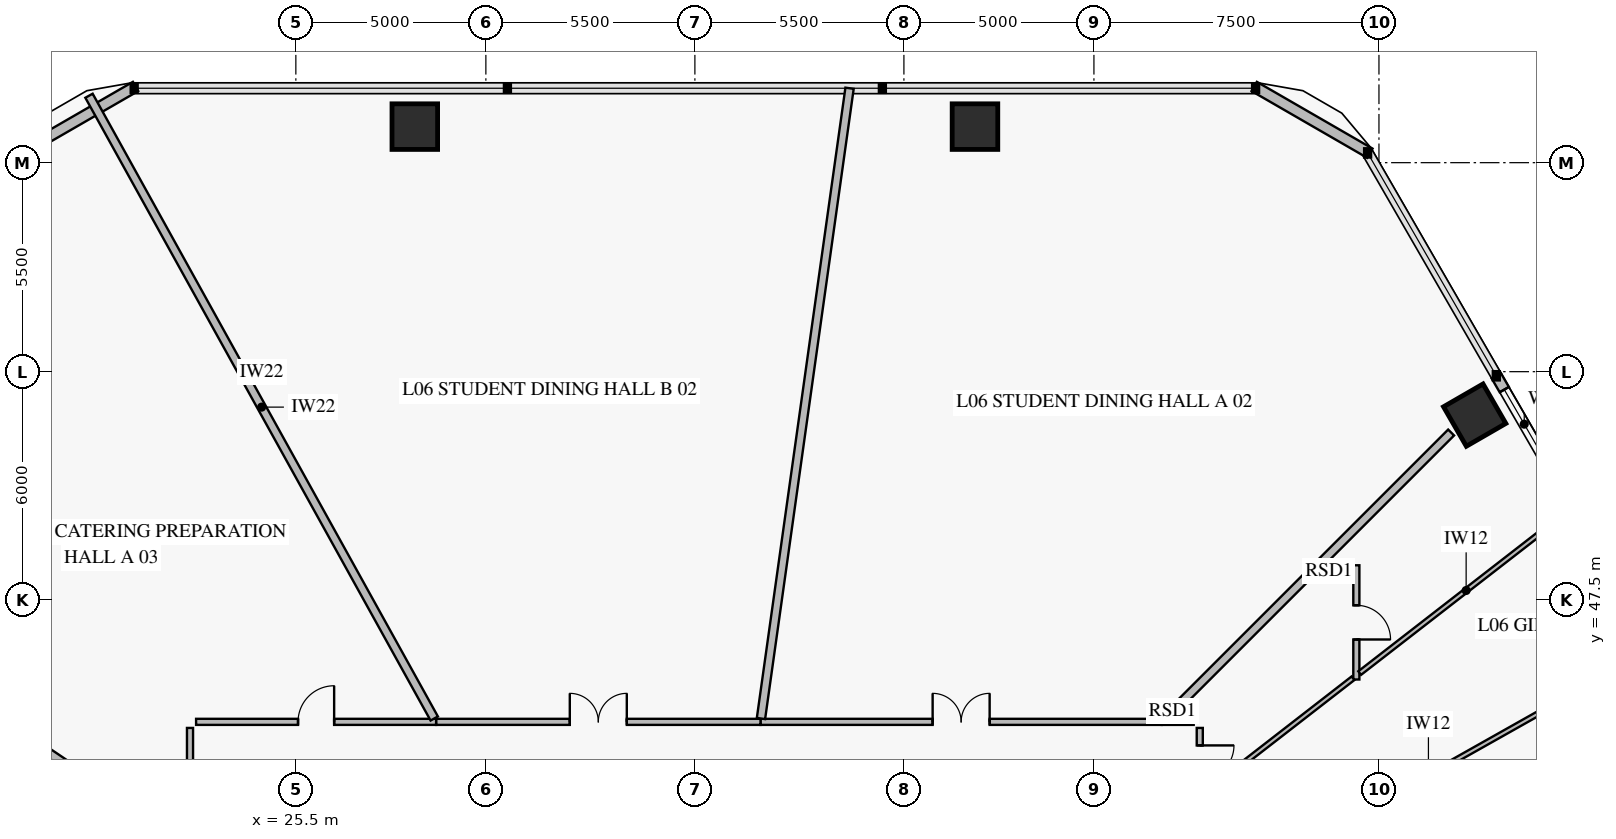
"""IFC4 building model, lengths in metres.
Left out: names, types, materials, properties, quantities, classifications, styles, units other than length and angle.
Written with IfcOpenShell. Run it as: python <this file> out.ifc"""

import sys

from ifc_helpers import new_model, si_unit, direction, frame, frame_2d, origin, origin_2d, place, context, subcontext, project, spatial, rectangle, extrude, element, fill, save


model = new_model("IFC4")
c1 = context("Model", 3, precision=1e-05, world=origin(), true_north=direction((0.0, 1.0)))
c2 = subcontext(c1, "Body", "Model", "MODEL_VIEW")
j1 = project(units=[si_unit("LENGTHUNIT", "METRE"), si_unit("PLANEANGLEUNIT", "RADIAN")], contexts=[c1])
p1 = place(None, origin())
s1 = spatial("IfcSite", under=j1, at=p1, CompositionType="ELEMENT")
p2 = place(p1, origin())
s2 = spatial("IfcBuilding", under=s1, at=p2, CompositionType="ELEMENT")
p3 = place(p2, frame((0.0, 0.0, 24.6)))
s3 = spatial("IfcBuildingStorey", under=s2, at=p3, CompositionType="ELEMENT", Elevation=24.6)
for number, where, z_axis, x_axis in (
    (1, (56.519, 52.357, 0.0), (0.0, 0.0, 1.0), (-0.5, 0.866, 0.0)),
    (2, (43.37, 59.948, 0.0), (0.0, 0.0, 1.0), (-1.0, 0.0, 0.0)),
    (3, (28.63, 59.948, 0.0), (0.0, 0.0, 1.0), (-1.0, 0.0, 0.0)),
):
    element("IfcColumn", number, at=place(p3, frame(where, z_axis=z_axis, x_axis=x_axis)), inside=s3, PredefinedType="COLUMN", context=c2, shape_type="SweptSolid", body=[
        extrude(rectangle(XDim=1.2, YDim=1.2, at=origin_2d()), origin(), (0.0, 0.0, 1.0), 3.92),
    ])
for number, where, z_axis, x_axis in (
    (4, (18.239, 59.249, 0.0), (0.0, 0.0, 1.0), (0.866, 0.5, 0.0)),
    (5, (50.717, 61.006, 0.0), (0.0, 0.0, 1.0), (0.866, -0.5, 0.0)),
):
    element("IfcWall", number, at=place(p3, frame(where, z_axis=z_axis, x_axis=x_axis)), inside=s3, PredefinedType="SOLIDWALL", context=c2, shape_type="SweptSolid", body=[
        extrude(rectangle(XDim=3.515, YDim=0.28, at=frame_2d((1.757, 0.0))), origin(), (0.0, 0.0, 1.0), 3.92),
    ])
p4 = place(p3, frame((57.088, 53.392, 0.0), z_axis=(0.0, 0.0, 1.0), x_axis=(0.500024377727, -0.866011328839, 0.0)))
e6 = element("IfcWall", 6, at=p4, inside=s3, PredefinedType="SOLIDWALL", context=c2, shape_type="SweptSolid", body=[
    extrude(rectangle(XDim=2.94, YDim=0.28, at=frame_2d((1.47, 0.0))), origin(), (0.0, 0.0, 1.0), 3.92),
])
p5 = place(p4, frame((0.42, 0.0, 0.7)))
e7 = element("IfcOpeningElement", 7, at=p5, cuts=e6, PredefinedType="OPENING", context=c2, shape_type="SweptSolid", body=[
    extrude(rectangle(XDim=2.1, YDim=1.5, at=frame_2d((1.05, 0.75))), frame((0.0, 0.152, 0.0), z_axis=(0.0, -1.0, 0.0), x_axis=(1.0, 0.0, 0.0)), (0.0, 0.0, 1.0), 0.304),
])
p6 = place(p3, frame((53.405, 48.405, 0.0), z_axis=(0.0, 0.0, 1.0), x_axis=(0.0, -1.0, 0.0)))
e8 = element("IfcWall", 8, at=p6, inside=s3, PredefinedType="PARTITIONING", context=c2, shape_type="SweptSolid", body=[
    extrude(rectangle(XDim=3.006, YDim=0.16, at=frame_2d((1.503, 0.0))), origin(), (0.0, 0.0, 1.0), 3.92),
])
p7 = place(p6, frame((1.053, 0.0, 0.0)))
e9 = element("IfcOpeningElement", 9, at=p7, cuts=e8, PredefinedType="OPENING", context=c2, shape_type="SweptSolid", body=[
    extrude(rectangle(XDim=0.9, YDim=2.1, at=frame_2d((0.45, 1.05))), frame((0.0, 0.092, 0.0), z_axis=(0.0, -1.0, 0.0), x_axis=(1.0, 0.0, 0.0)), (0.0, 0.0, 1.0), 0.184),
])
p8 = place(p3, frame((49.285, 42.305, 0.0), z_axis=(0.0, 0.0, 1.0), x_axis=(0.0, 1.0, 0.0)))
e10 = element("IfcWall", 10, at=p8, inside=s3, PredefinedType="PARTITIONING", context=c2, shape_type="SweptSolid", body=[
    extrude(rectangle(XDim=1.82, YDim=0.16, at=frame_2d((0.91, 0.0))), origin(), (0.0, 0.0, 1.0), 3.92),
])
p9 = place(p8, frame((0.46, 0.0, 0.0)))
e11 = element("IfcOpeningElement", 11, at=p9, cuts=e10, PredefinedType="OPENING", context=c2, shape_type="SweptSolid", body=[
    extrude(rectangle(XDim=0.9, YDim=2.1, at=frame_2d((0.45, 1.05))), frame((0.0, 0.092, 0.0), z_axis=(0.0, -1.0, 0.0), x_axis=(1.0, 0.0, 0.0)), (0.0, 0.0, 1.0), 0.184),
])
p10 = place(p3, frame((48.285, 44.285, 0.0), z_axis=(0.0, 0.0, 1.0), x_axis=(-1.0, 0.0, 0.0)))
e12 = element("IfcWall", 12, at=p10, inside=s3, PredefinedType="PARTITIONING", context=c2, shape_type="SweptSolid", body=[
    extrude(rectangle(XDim=10.558, YDim=0.16, at=frame_2d((5.279, 0.0))), origin(), (0.0, 0.0, 1.0), 3.22),
])
p11 = place(p10, frame((4.529, 0.0, 0.0)))
e13 = element("IfcOpeningElement", 13, at=p11, cuts=e12, PredefinedType="OPENING", context=c2, shape_type="SweptSolid", body=[
    extrude(rectangle(XDim=1.5, YDim=2.15, at=frame_2d((0.75, 1.075))), frame((0.0, 0.092, 0.0), z_axis=(0.0, -1.0, 0.0), x_axis=(1.0, 0.0, 0.0)), (0.0, 0.0, 1.0), 0.184),
])
p12 = place(p3, frame((37.727, 44.285, 0.0), z_axis=(0.0, 0.0, 1.0), x_axis=(-1.0, 0.0, 0.0)))
e14 = element("IfcWall", 14, at=p12, inside=s3, PredefinedType="PARTITIONING", context=c2, shape_type="SweptSolid", body=[
    extrude(rectangle(XDim=8.536, YDim=0.16, at=frame_2d((4.268, 0.0))), origin(), (0.0, 0.0, 1.0), 3.22),
])
p13 = place(p12, frame((3.518, 0.0, 0.0)))
e15 = element("IfcOpeningElement", 15, at=p13, cuts=e14, PredefinedType="OPENING", context=c2, shape_type="SweptSolid", body=[
    extrude(rectangle(XDim=1.5, YDim=2.15, at=frame_2d((0.75, 1.075))), frame((0.0, 0.092, 0.0), z_axis=(0.0, -1.0, 0.0), x_axis=(1.0, 0.0, 0.0)), (0.0, 0.0, 1.0), 0.184),
])
p14 = place(p3, frame((29.19, 44.285, 0.0), z_axis=(0.0, 0.0, 1.0), x_axis=(-1.0, 0.0, 0.0)))
e16 = element("IfcWall", 16, at=p14, inside=s3, PredefinedType="PARTITIONING", context=c2, shape_type="SweptSolid", body=[
    extrude(rectangle(XDim=6.315, YDim=0.16, at=frame_2d((3.158, 0.0))), origin(), (0.0, 0.0, 1.0), 3.22),
])
p15 = place(p14, frame((2.683, 0.0, 0.0)))
e17 = element("IfcOpeningElement", 17, at=p15, cuts=e16, PredefinedType="OPENING", context=c2, shape_type="SweptSolid", body=[
    extrude(rectangle(XDim=0.95, YDim=2.1, at=frame_2d((0.475, 1.05))), frame((0.0, 0.092, 0.0), z_axis=(0.0, -1.0, 0.0), x_axis=(1.0, 0.0, 0.0)), (0.0, 0.0, 1.0), 0.184),
])
p16 = place(p3, frame((49.373, 39.535, 0.0), z_axis=(0.0, 0.0, 1.0), x_axis=(0.871218886354, 0.490894746417, 0.0)))
e18 = element("IfcWall", 18, at=p16, inside=s3, PredefinedType="PARTITIONING", context=c2, shape_type="SweptSolid", body=[
    extrude(rectangle(XDim=13.61, YDim=0.12, at=frame_2d((6.805, 0.0))), origin(), (0.0, 0.0, 1.0), 3.17),
])
p17 = place(p3, frame((49.373, 42.373, 0.0), z_axis=(0.0, 0.0, 1.0), x_axis=(0.790162754328, 0.612897072658, 0.0)))
e19 = element("IfcWall", 19, at=p17, inside=s3, PredefinedType="PARTITIONING", context=c2, shape_type="SweptSolid", body=[
    extrude(rectangle(XDim=4.991, YDim=0.12, at=frame_2d((2.496, 0.0))), origin(), (0.0, 0.0, 1.0), 3.47),
])
p18 = place(p3, frame((53.493, 45.569, 0.0), z_axis=(0.0, 0.0, 1.0), x_axis=(0.79017658067, 0.612879246965, 0.0)))
e20 = element("IfcWall", 20, at=p18, inside=s3, PredefinedType="PARTITIONING", context=c2, shape_type="SweptSolid", body=[
    extrude(rectangle(XDim=7.09, YDim=0.12, at=frame_2d((3.545, 0.0))), origin(), (0.0, 0.0, 1.0), 3.17),
])
p19 = place(p3, frame((52.292, 48.405, 0.0), z_axis=(0.0, 0.0, 1.0), x_axis=(1.0, 0.0, 0.0)))
e21 = element("IfcWall", 21, at=p19, inside=s3, PredefinedType="PARTITIONING", context=c2, shape_type="SweptSolid", body=[
    extrude(rectangle(XDim=1.025, YDim=0.16, at=frame_2d((0.512, 0.0))), origin(), (0.0, 0.0, 1.0), 3.22),
])
p20 = place(p3, frame((49.125, 44.285, 0.0), z_axis=(0.0, 0.0, 1.0), x_axis=(-1.0, 0.0, 0.0)))
e22 = element("IfcWall", 22, at=p20, inside=s3, PredefinedType="PARTITIONING", context=c2, shape_type="SweptSolid", body=[
    extrude(rectangle(XDim=0.84, YDim=0.16, at=frame_2d((0.42, 0.0))), origin(), (0.0, 0.0, 1.0), 3.22),
])
p21 = place(p3, frame((48.373, 44.373, 0.0), z_axis=(0.0, 0.0, 1.0), x_axis=(0.707106781187, 0.707106781187, 0.0)))
e23 = element("IfcWall", 23, at=p21, inside=s3, PredefinedType="PARTITIONING", context=c2, shape_type="SweptSolid", body=[
    extrude(rectangle(XDim=5.577, YDim=0.22, at=frame_2d((2.789, 0.0))), origin(), (0.0, 0.0, 1.0), 3.22),
])
p22 = place(p3, frame((52.493, 48.493, 0.0), z_axis=(0.0, 0.0, 1.0), x_axis=(0.707106781187, 0.707106781187, 0.0)))
e24 = element("IfcWall", 24, at=p22, inside=s3, PredefinedType="PARTITIONING", context=c2, shape_type="SweptSolid", body=[
    extrude(rectangle(XDim=4.817, YDim=0.22, at=frame_2d((2.408, 0.0))), origin(), (0.0, 0.0, 1.0), 3.22),
])
p23 = place(p3, frame((37.739, 44.373, 0.0), z_axis=(0.0, 0.0, 1.0), x_axis=(0.139165938444, 0.990269075341, 0.0)))
e25 = element("IfcWall", 25, at=p23, inside=s3, PredefinedType="PARTITIONING", context=c2, shape_type="SweptSolid", body=[
    extrude(rectangle(XDim=16.749, YDim=0.22, at=frame_2d((8.374, 0.0))), origin(), (0.0, 0.0, 1.0), 3.17),
])
p24 = place(p3, frame((29.142, 44.373, 0.0), z_axis=(0.0, 0.0, 1.0), x_axis=(-0.484814111505, 0.874617217579, 0.0)))
e26 = element("IfcWall", 26, at=p24, inside=s3, PredefinedType="PARTITIONING", context=c2, shape_type="SweptSolid", body=[
    extrude(rectangle(XDim=18.738, YDim=0.22, at=frame_2d((9.369, 0.0))), origin(), (0.0, 0.0, 1.0), 3.17),
])
p25 = place(p3, frame((22.715, 40.961, 0.0), z_axis=(0.0, 0.0, 1.0), x_axis=(-0.829037316792, 0.559193282654, 0.0)))
e27 = element("IfcWall", 27, at=p25, inside=s3, PredefinedType="PARTITIONING", context=c2, shape_type="SweptSolid", body=[
    extrude(rectangle(XDim=13.005, YDim=0.22, at=frame_2d((6.502, 0.0))), origin(), (0.0, 0.0, 1.0), 3.17),
])
p26 = place(p3, frame((22.715, 44.125, 0.0), z_axis=(0.0, 0.0, 1.0), x_axis=(0.0, -1.0, 0.0)))
e28 = element("IfcWall", 28, at=p26, inside=s3, PredefinedType="PARTITIONING", context=c2, shape_type="SweptSolid", body=[
    extrude(rectangle(XDim=3.022, YDim=0.16, at=frame_2d((1.511, 0.0))), origin(), (0.0, 0.0, 1.0), 3.92),
])
p27 = place(p5, origin())
e29 = element("IfcWindow", 29, at=p27, inside=s3, PartitioningType="SINGLE_PANEL", PredefinedType="WINDOW", context=c2, shape_type="SweptSolid", body=[
    extrude(rectangle(XDim=2.1, YDim=1.5, at=frame_2d((1.05, 0.75))), frame((0.0, 0.03, 0.0), z_axis=(0.0, -1.0, 0.0), x_axis=(1.0, 0.0, 0.0)), (0.0, 0.0, 1.0), 0.06),
])
fill(e7, e29)
p28 = place(p7, origin())
e30 = element("IfcDoor", 30, at=p28, inside=s3, OperationType="SINGLE_SWING_RIGHT", PredefinedType="DOOR", context=c2, shape_type="SweptSolid", body=[
    extrude(rectangle(XDim=0.9, YDim=2.1, at=frame_2d((0.45, 1.05))), frame((0.0, 0.025, 0.0), z_axis=(0.0, -1.0, 0.0), x_axis=(1.0, 0.0, 0.0)), (0.0, 0.0, 1.0), 0.05),
])
fill(e9, e30)
p29 = place(p9, frame((0.9, 0.0, 0.0), z_axis=(0.0, 0.0, 1.0), x_axis=(-1.0, 0.0, 0.0)))
e31 = element("IfcDoor", 31, at=p29, inside=s3, OperationType="SINGLE_SWING_LEFT", PredefinedType="DOOR", context=c2, shape_type="SweptSolid", body=[
    extrude(rectangle(XDim=0.9, YDim=2.1, at=frame_2d((0.45, 1.05))), frame((0.0, 0.025, 0.0), z_axis=(0.0, -1.0, 0.0), x_axis=(1.0, 0.0, 0.0)), (0.0, 0.0, 1.0), 0.05),
])
fill(e11, e31)
p30 = place(p11, frame((1.5, 0.0, 0.0), z_axis=(0.0, 0.0, 1.0), x_axis=(-1.0, 0.0, 0.0)))
e32 = element("IfcDoor", 32, at=p30, inside=s3, OperationType="DOUBLE_DOOR_SINGLE_SWING", PredefinedType="DOOR", context=c2, shape_type="SweptSolid", body=[
    extrude(rectangle(XDim=1.5, YDim=2.15, at=frame_2d((0.75, 1.075))), frame((0.0, 0.025, 0.0), z_axis=(0.0, -1.0, 0.0), x_axis=(1.0, 0.0, 0.0)), (0.0, 0.0, 1.0), 0.05),
])
fill(e13, e32)
p31 = place(p13, frame((1.5, 0.0, 0.0), z_axis=(0.0, 0.0, 1.0), x_axis=(-1.0, 0.0, 0.0)))
e33 = element("IfcDoor", 33, at=p31, inside=s3, OperationType="DOUBLE_DOOR_SINGLE_SWING", PredefinedType="DOOR", context=c2, shape_type="SweptSolid", body=[
    extrude(rectangle(XDim=1.5, YDim=2.15, at=frame_2d((0.75, 1.075))), frame((0.0, 0.025, 0.0), z_axis=(0.0, -1.0, 0.0), x_axis=(1.0, 0.0, 0.0)), (0.0, 0.0, 1.0), 0.05),
])
fill(e15, e33)
p32 = place(p15, frame((0.95, 0.0, 0.0), z_axis=(0.0, 0.0, 1.0), x_axis=(-1.0, 0.0, 0.0)))
e34 = element("IfcDoor", 34, at=p32, inside=s3, OperationType="SINGLE_SWING_RIGHT", PredefinedType="DOOR", context=c2, shape_type="SweptSolid", body=[
    extrude(rectangle(XDim=0.95, YDim=2.1, at=frame_2d((0.475, 1.05))), frame((0.0, 0.025, 0.0), z_axis=(0.0, -1.0, 0.0), x_axis=(1.0, 0.0, 0.0)), (0.0, 0.0, 1.0), 0.05),
])
fill(e17, e34)
save(model, sys.argv[1])
